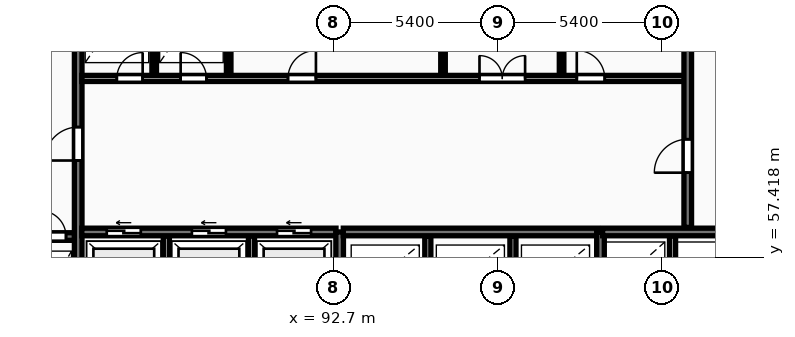
"""IFC4 building model, lengths in metres.
Left out: names, types, materials, properties, quantities, classifications, styles, units other than length and angle.
Written with IfcOpenShell. Run it as: python <this file> out.ifc"""

import sys

from ifc_helpers import new_model, si_unit, direction, frame, frame_2d, origin, place, context, subcontext, project, spatial, rectangle, extrude, element, fill, save


model = new_model("IFC4")
c1 = context("Model", 3, precision=1e-05, world=origin(), true_north=direction((0.0, 1.0)))
c2 = subcontext(c1, "Body", "Model", "MODEL_VIEW")
j1 = project(units=[si_unit("LENGTHUNIT", "METRE"), si_unit("PLANEANGLEUNIT", "RADIAN")], contexts=[c1])
p1 = place(None, origin())
s1 = spatial("IfcSite", under=j1, at=p1, CompositionType="ELEMENT")
p2 = place(p1, origin())
s2 = spatial("IfcBuilding", under=s1, at=p2, CompositionType="ELEMENT")
p3 = place(p2, frame((0.0, 0.0, 76.0)))
s3 = spatial("IfcBuildingStorey", under=s2, at=p3, CompositionType="ELEMENT", Elevation=76.0)
p4 = place(p3, frame((79.79, 58.1, 0.0), z_axis=(0.0, 0.0, 1.0), x_axis=(1.0, 0.0, 0.0)))
e1 = element("IfcWall", 1, at=p4, inside=s3, PredefinedType="SHEAR", context=c2, shape_type="SweptSolid", body=[
    extrude(rectangle(XDim=4.39, YDim=0.25, at=frame_2d((2.195, 0.0))), origin(), (0.0, 0.0, 1.0), 4.8),
])
p5 = place(p4, frame((1.05, 0.0, 0.0)))
e2 = element("IfcOpeningElement", 2, at=p5, cuts=e1, PredefinedType="OPENING", context=c2, shape_type="SweptSolid", body=[
    extrude(rectangle(XDim=1.12, YDim=2.12, at=frame_2d((0.56, 1.06))), frame((0.0, 0.135, 0.0), z_axis=(0.0, -1.0, 0.0), x_axis=(1.0, 0.0, 0.0)), (0.0, 0.0, 1.0), 0.27),
])
p6 = place(p4, frame((3.26, 0.0, 0.0)))
e3 = element("IfcOpeningElement", 3, at=p6, cuts=e1, PredefinedType="OPENING", context=c2, shape_type="SweptSolid", body=[
    extrude(rectangle(XDim=0.85, YDim=2.05, at=frame_2d((0.425, 1.025))), frame((0.0, 0.135, 0.0), z_axis=(0.0, -1.0, 0.0), x_axis=(1.0, 0.0, 0.0)), (0.0, 0.0, 1.0), 0.27),
])
p7 = place(p3, frame((84.3, 55.4, 0.0), z_axis=(0.0, 0.0, 1.0), x_axis=(0.0, 1.0, 0.0)))
e4 = element("IfcWall", 4, at=p7, inside=s3, PredefinedType="SHEAR", context=c2, shape_type="SweptSolid", body=[
    extrude(rectangle(XDim=11.6, YDim=0.25, at=frame_2d((5.8, 0.0))), origin(), (0.0, 0.0, 1.0), 4.8),
])
p8 = place(p7, frame((5.2, 0.0, 0.0)))
e5 = element("IfcOpeningElement", 5, at=p8, cuts=e4, PredefinedType="OPENING", context=c2, shape_type="SweptSolid", body=[
    extrude(rectangle(XDim=1.1, YDim=2.1, at=frame_2d((0.55, 1.05))), frame((0.0, 0.135, 0.0), z_axis=(0.0, -1.0, 0.0), x_axis=(1.0, 0.0, 0.0)), (0.0, 0.0, 1.0), 0.27),
])
for number, where, z_axis, x_axis in (
    (6, (87.2, 55.4, 0.0), (0.0, 0.0, 1.0), (0.0, 1.0, 0.0)),
    (7, (90.0, 55.4, 0.0), (0.0, 0.0, 1.0), (0.0, 1.0, 0.0)),
):
    element("IfcWall", number, at=place(p3, frame(where, z_axis=z_axis, x_axis=x_axis)), inside=s3, PredefinedType="PARTITIONING", context=c2, shape_type="SweptSolid", body=[
        extrude(rectangle(XDim=2.72, YDim=0.2, at=frame_2d((1.36, 0.0))), origin(), (0.0, 0.0, 1.0), 4.48),
    ])
p9 = place(p3, frame((84.42, 58.25, 0.0), z_axis=(0.0, 0.0, 1.0), x_axis=(1.0, 0.0, 0.0)))
e8 = element("IfcWall", 8, at=p9, inside=s3, PredefinedType="SHEAR", context=c2, shape_type="SweptSolid", body=[
    extrude(rectangle(XDim=8.36, YDim=0.25, at=frame_2d((4.18, 0.0))), origin(), (0.0, 0.0, 1.0), 4.8),
])
p10 = place(p9, frame((0.82, 0.0, 0.0)))
e9 = element("IfcOpeningElement", 9, at=p10, cuts=e8, PredefinedType="OPENING", context=c2, shape_type="SweptSolid", body=[
    extrude(rectangle(XDim=1.12, YDim=2.12, at=frame_2d((0.56, 1.06))), frame((0.0, 0.135, 0.0), z_axis=(0.0, -1.0, 0.0), x_axis=(1.0, 0.0, 0.0)), (0.0, 0.0, 1.0), 0.27),
])
p11 = place(p9, frame((3.62, 0.0, 0.0)))
e10 = element("IfcOpeningElement", 10, at=p11, cuts=e8, PredefinedType="OPENING", context=c2, shape_type="SweptSolid", body=[
    extrude(rectangle(XDim=1.12, YDim=2.12, at=frame_2d((0.56, 1.06))), frame((0.0, 0.135, 0.0), z_axis=(0.0, -1.0, 0.0), x_axis=(1.0, 0.0, 0.0)), (0.0, 0.0, 1.0), 0.27),
])
p12 = place(p9, frame((6.42, 0.0, 0.0)))
e11 = element("IfcOpeningElement", 11, at=p12, cuts=e8, PredefinedType="OPENING", context=c2, shape_type="SweptSolid", body=[
    extrude(rectangle(XDim=1.12, YDim=2.12, at=frame_2d((0.56, 1.06))), frame((0.0, 0.135, 0.0), z_axis=(0.0, -1.0, 0.0), x_axis=(1.0, 0.0, 0.0)), (0.0, 0.0, 1.0), 0.27),
])
p13 = place(p3, frame((92.9, 55.4, 0.0), z_axis=(0.0, 0.0, 1.0), x_axis=(0.0, 1.0, 0.0)))
e12 = element("IfcWall", 12, at=p13, inside=s3, PredefinedType="SHEAR", context=c2, shape_type="SweptSolid", body=[
    extrude(rectangle(XDim=2.85, YDim=0.25, at=frame_2d((1.425, 0.0))), origin(), (0.0, 0.0, 1.0), 4.8),
])
for number, where, z_axis, x_axis in (
    (13, (95.8, 55.4, 0.0), (0.0, 0.0, 1.0), (0.0, 1.0, 0.0)),
    (14, (98.6, 55.4, 0.0), (0.0, 0.0, 1.0), (0.0, 1.0, 0.0)),
):
    element("IfcWall", number, at=place(p3, frame(where, z_axis=z_axis, x_axis=x_axis)), inside=s3, PredefinedType="PARTITIONING", context=c2, shape_type="SweptSolid", body=[
        extrude(rectangle(XDim=2.72, YDim=0.2, at=frame_2d((1.36, 0.0))), origin(), (0.0, 0.0, 1.0), 4.48),
    ])
p14 = place(p3, frame((93.02, 58.25, 0.0), z_axis=(0.0, 0.0, 1.0), x_axis=(1.0, 0.0, 0.0)))
e15 = element("IfcWall", 15, at=p14, inside=s3, PredefinedType="SHEAR", context=c2, shape_type="SweptSolid", body=[
    extrude(rectangle(XDim=8.36, YDim=0.25, at=frame_2d((4.18, 0.0))), origin(), (0.0, 0.0, 1.0), 4.8),
])
p15 = place(p3, frame((101.48, 55.4, 0.0), z_axis=(0.0, 0.0, 1.0), x_axis=(0.0, 1.0, 0.0)))
e16 = element("IfcWall", 16, at=p15, inside=s3, PredefinedType="SHEAR", context=c2, shape_type="SweptSolid", body=[
    extrude(rectangle(XDim=2.85, YDim=0.25, at=frame_2d((1.425, 0.0))), origin(), (0.0, 0.0, 1.0), 4.8),
])
p16 = place(p3, frame((103.85, 55.4, 0.0), z_axis=(0.0, 0.0, 1.0), x_axis=(0.0, 1.0, 0.0)))
e17 = element("IfcWall", 17, at=p16, inside=s3, PredefinedType="PARTITIONING", context=c2, shape_type="SweptSolid", body=[
    extrude(rectangle(XDim=2.72, YDim=0.2, at=frame_2d((1.36, 0.0))), origin(), (0.0, 0.0, 1.0), 4.48),
])
p17 = place(p3, frame((101.55, 58.25, 0.0), z_axis=(0.0, 0.0, 1.0), x_axis=(1.0, 0.0, 0.0)))
e18 = element("IfcWall", 18, at=p17, inside=s3, PredefinedType="SHEAR", context=c2, shape_type="SweptSolid", body=[
    extrude(rectangle(XDim=4.6, YDim=0.25, at=frame_2d((2.3, 0.0))), origin(), (0.0, 0.0, 1.0), 4.8),
])
for number, where, z_axis, x_axis in (
    (19, (86.8, 63.4, 0.0), (0.0, 0.0, 1.0), (0.0, 1.0, 0.0)),
    (20, (89.25, 63.4, 0.0), (0.0, 0.0, 1.0), (0.0, 1.0, 0.0)),
    (21, (96.3, 63.4, 0.0), (0.0, 0.0, 1.0), (0.0, 1.0, 0.0)),
    (22, (100.2, 63.4, 0.0), (0.0, 0.0, 1.0), (0.0, 1.0, 0.0)),
):
    element("IfcWall", number, at=place(p3, frame(where, z_axis=z_axis, x_axis=x_axis)), inside=s3, PredefinedType="PARTITIONING", context=c2, shape_type="SweptSolid", body=[
        extrude(rectangle(XDim=3.6, YDim=0.15, at=frame_2d((1.8, 0.0))), origin(), (0.0, 0.0, 1.0), 4.48),
    ])
p18 = place(p3, frame((84.42, 63.3, 0.0), z_axis=(0.0, 0.0, 1.0), x_axis=(1.0, 0.0, 0.0)))
e23 = element("IfcWall", 23, at=p18, inside=s3, PredefinedType="PARTITIONING", context=c2, shape_type="SweptSolid", body=[
    extrude(rectangle(XDim=19.83, YDim=0.2, at=frame_2d((9.915, 0.0))), origin(), (0.0, 0.0, 1.0), 4.48),
])
p19 = place(p18, frame((1.15, 0.0, 0.0)))
e24 = element("IfcOpeningElement", 24, at=p19, cuts=e23, PredefinedType="OPENING", context=c2, shape_type="SweptSolid", body=[
    extrude(rectangle(XDim=0.85, YDim=2.05, at=frame_2d((0.425, 1.025))), frame((0.0, 0.11, 0.0), z_axis=(0.0, -1.0, 0.0), x_axis=(1.0, 0.0, 0.0)), (0.0, 0.0, 1.0), 0.22),
])
p20 = place(p18, frame((3.25, 0.0, 0.0)))
e25 = element("IfcOpeningElement", 25, at=p20, cuts=e23, PredefinedType="OPENING", context=c2, shape_type="SweptSolid", body=[
    extrude(rectangle(XDim=0.85, YDim=2.05, at=frame_2d((0.425, 1.025))), frame((0.0, 0.11, 0.0), z_axis=(0.0, -1.0, 0.0), x_axis=(1.0, 0.0, 0.0)), (0.0, 0.0, 1.0), 0.22),
])
p21 = place(p18, frame((13.08, 0.0, 0.0)))
e26 = element("IfcOpeningElement", 26, at=p21, cuts=e23, PredefinedType="OPENING", context=c2, shape_type="SweptSolid", body=[
    extrude(rectangle(XDim=1.5, YDim=2.2, at=frame_2d((0.75, 1.1))), frame((0.0, 0.11, 0.0), z_axis=(0.0, -1.0, 0.0), x_axis=(1.0, 0.0, 0.0)), (0.0, 0.0, 1.0), 0.22),
])
p22 = place(p18, frame((6.78, 0.0, 0.0)))
e27 = element("IfcOpeningElement", 27, at=p22, cuts=e23, PredefinedType="OPENING", context=c2, shape_type="SweptSolid", body=[
    extrude(rectangle(XDim=0.92, YDim=2.08, at=frame_2d((0.46, 1.04))), frame((0.0, 0.11, 0.0), z_axis=(0.0, -1.0, 0.0), x_axis=(1.0, 0.0, 0.0)), (0.0, 0.0, 1.0), 0.22),
])
p23 = place(p18, frame((16.28, 0.0, 0.0)))
e28 = element("IfcOpeningElement", 28, at=p23, cuts=e23, PredefinedType="OPENING", context=c2, shape_type="SweptSolid", body=[
    extrude(rectangle(XDim=0.92, YDim=2.08, at=frame_2d((0.46, 1.04))), frame((0.0, 0.11, 0.0), z_axis=(0.0, -1.0, 0.0), x_axis=(1.0, 0.0, 0.0)), (0.0, 0.0, 1.0), 0.22),
])
p24 = place(p3, frame((104.35, 58.4, 0.0), z_axis=(0.0, 0.0, 1.0), x_axis=(0.0, 1.0, 0.0)))
e29 = element("IfcWall", 29, at=p24, inside=s3, PredefinedType="SHEAR", context=c2, shape_type="SweptSolid", body=[
    extrude(rectangle(XDim=8.6, YDim=0.25, at=frame_2d((4.3, 0.0))), origin(), (0.0, 0.0, 1.0), 4.8),
])
p25 = place(p24, frame((1.8, 0.0, 0.0)))
e30 = element("IfcOpeningElement", 30, at=p25, cuts=e29, PredefinedType="OPENING", context=c2, shape_type="SweptSolid", body=[
    extrude(rectangle(XDim=1.1, YDim=2.1, at=frame_2d((0.55, 1.05))), frame((0.0, 0.135, 0.0), z_axis=(0.0, -1.0, 0.0), x_axis=(1.0, 0.0, 0.0)), (0.0, 0.0, 1.0), 0.27),
])
p26 = place(p6, origin())
e31 = element("IfcDoor", 31, at=p26, inside=s3, OperationType="SINGLE_SWING_LEFT", PredefinedType="DOOR", context=c2, shape_type="SweptSolid", body=[
    extrude(rectangle(XDim=0.85, YDim=2.05, at=frame_2d((0.425, 1.025))), frame((0.0, 0.025, 0.0), z_axis=(0.0, -1.0, 0.0), x_axis=(1.0, 0.0, 0.0)), (0.0, 0.0, 1.0), 0.05),
])
fill(e3, e31)
p27 = place(p8, origin())
e32 = element("IfcDoor", 32, at=p27, inside=s3, OperationType="SINGLE_SWING_LEFT", PredefinedType="DOOR", context=c2, shape_type="SweptSolid", body=[
    extrude(rectangle(XDim=1.1, YDim=2.1, at=frame_2d((0.55, 1.05))), frame((0.0, 0.025, 0.0), z_axis=(0.0, -1.0, 0.0), x_axis=(1.0, 0.0, 0.0)), (0.0, 0.0, 1.0), 0.05),
])
fill(e5, e32)
p28 = place(p10, origin())
e33 = element("IfcDoor", 33, at=p28, inside=s3, OperationType="SLIDING_TO_LEFT", PredefinedType="DOOR", context=c2, shape_type="SweptSolid", body=[
    extrude(rectangle(XDim=1.12, YDim=2.12, at=frame_2d((0.56, 1.06))), frame((0.0, 0.025, 0.0), z_axis=(0.0, -1.0, 0.0), x_axis=(1.0, 0.0, 0.0)), (0.0, 0.0, 1.0), 0.05),
])
fill(e9, e33)
p29 = place(p11, origin())
e34 = element("IfcDoor", 34, at=p29, inside=s3, OperationType="SLIDING_TO_LEFT", PredefinedType="DOOR", context=c2, shape_type="SweptSolid", body=[
    extrude(rectangle(XDim=1.12, YDim=2.12, at=frame_2d((0.56, 1.06))), frame((0.0, 0.025, 0.0), z_axis=(0.0, -1.0, 0.0), x_axis=(1.0, 0.0, 0.0)), (0.0, 0.0, 1.0), 0.05),
])
fill(e10, e34)
p30 = place(p12, origin())
e35 = element("IfcDoor", 35, at=p30, inside=s3, OperationType="SLIDING_TO_LEFT", PredefinedType="DOOR", context=c2, shape_type="SweptSolid", body=[
    extrude(rectangle(XDim=1.12, YDim=2.12, at=frame_2d((0.56, 1.06))), frame((0.0, 0.025, 0.0), z_axis=(0.0, -1.0, 0.0), x_axis=(1.0, 0.0, 0.0)), (0.0, 0.0, 1.0), 0.05),
])
fill(e11, e35)
p31 = place(p19, origin())
e36 = element("IfcDoor", 36, at=p31, inside=s3, OperationType="SINGLE_SWING_RIGHT", PredefinedType="DOOR", context=c2, shape_type="SweptSolid", body=[
    extrude(rectangle(XDim=0.85, YDim=2.05, at=frame_2d((0.425, 1.025))), frame((0.0, 0.025, 0.0), z_axis=(0.0, -1.0, 0.0), x_axis=(1.0, 0.0, 0.0)), (0.0, 0.0, 1.0), 0.05),
])
fill(e24, e36)
p32 = place(p20, origin())
e37 = element("IfcDoor", 37, at=p32, inside=s3, OperationType="SINGLE_SWING_LEFT", PredefinedType="DOOR", context=c2, shape_type="SweptSolid", body=[
    extrude(rectangle(XDim=0.85, YDim=2.05, at=frame_2d((0.425, 1.025))), frame((0.0, 0.025, 0.0), z_axis=(0.0, -1.0, 0.0), x_axis=(1.0, 0.0, 0.0)), (0.0, 0.0, 1.0), 0.05),
])
fill(e25, e37)
p33 = place(p21, origin())
e38 = element("IfcDoor", 38, at=p33, inside=s3, OperationType="DOUBLE_DOOR_SINGLE_SWING", PredefinedType="DOOR", context=c2, shape_type="SweptSolid", body=[
    extrude(rectangle(XDim=1.5, YDim=2.2, at=frame_2d((0.75, 1.1))), frame((0.0, 0.025, 0.0), z_axis=(0.0, -1.0, 0.0), x_axis=(1.0, 0.0, 0.0)), (0.0, 0.0, 1.0), 0.05),
])
fill(e26, e38)
p34 = place(p22, origin())
e39 = element("IfcDoor", 39, at=p34, inside=s3, OperationType="SINGLE_SWING_RIGHT", PredefinedType="DOOR", context=c2, shape_type="SweptSolid", body=[
    extrude(rectangle(XDim=0.92, YDim=2.08, at=frame_2d((0.46, 1.04))), frame((0.0, 0.025, 0.0), z_axis=(0.0, -1.0, 0.0), x_axis=(1.0, 0.0, 0.0)), (0.0, 0.0, 1.0), 0.05),
])
fill(e27, e39)
p35 = place(p23, origin())
e40 = element("IfcDoor", 40, at=p35, inside=s3, OperationType="SINGLE_SWING_LEFT", PredefinedType="DOOR", context=c2, shape_type="SweptSolid", body=[
    extrude(rectangle(XDim=0.92, YDim=2.08, at=frame_2d((0.46, 1.04))), frame((0.0, 0.025, 0.0), z_axis=(0.0, -1.0, 0.0), x_axis=(1.0, 0.0, 0.0)), (0.0, 0.0, 1.0), 0.05),
])
fill(e28, e40)
p36 = place(p25, origin())
e41 = element("IfcDoor", 41, at=p36, inside=s3, OperationType="SINGLE_SWING_LEFT", PredefinedType="DOOR", context=c2, shape_type="SweptSolid", body=[
    extrude(rectangle(XDim=1.1, YDim=2.1, at=frame_2d((0.55, 1.05))), frame((0.0, 0.025, 0.0), z_axis=(0.0, -1.0, 0.0), x_axis=(1.0, 0.0, 0.0)), (0.0, 0.0, 1.0), 0.05),
])
fill(e30, e41)
save(model, sys.argv[1])
